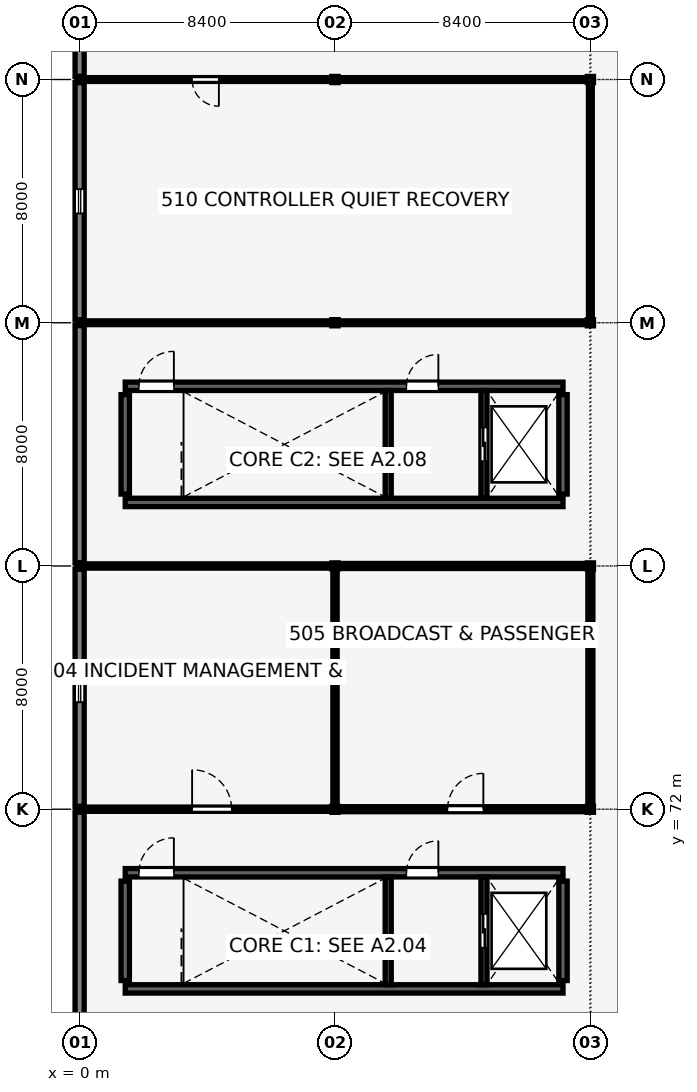
"""IFC4 building model, lengths in metres.
Left out: names, types, materials, properties, quantities, classifications, styles, units other than length and angle.
Written with IfcOpenShell. Run it as: python <this file> out.ifc"""

import sys

from ifc_helpers import new_model, si_unit, direction, frame, frame_2d, origin, origin_2d, place, context, subcontext, project, spatial, rectangle, hollow_rectangle, i_section, extrude, element, fill, save


model = new_model("IFC4")
c1 = context("Model", 3, precision=1e-05, world=origin(), true_north=direction((0.0, 1.0)))
c2 = subcontext(c1, "Body", "Model", "MODEL_VIEW")
j1 = project(units=[si_unit("LENGTHUNIT", "METRE"), si_unit("PLANEANGLEUNIT", "RADIAN")], contexts=[c1])
p1 = place(None, origin())
s1 = spatial("IfcSite", under=j1, at=p1, CompositionType="ELEMENT")
p2 = place(p1, origin())
s2 = spatial("IfcBuilding", under=s1, at=p2, CompositionType="ELEMENT")
p3 = place(p2, frame((0.0, 0.0, 21.04)))
s3 = spatial("IfcBuildingStorey", under=s2, at=p3, CompositionType="ELEMENT", Elevation=21.04)
p4 = place(p3, frame((1.5, 66.09, 0.0), z_axis=(0.0, 0.0, 1.0), x_axis=(1.0, 0.0, 0.0)))
e1 = element("IfcWall", 1, at=p4, inside=s3, PredefinedType="SHEAR", context=c2, shape_type="SweptSolid", body=[
    extrude(rectangle(XDim=14.4, YDim=0.275, at=frame_2d((7.2, 0.0))), origin(), (0.0, 0.0, 1.0), 3.92),
])
p5 = place(p3, frame((1.5, 69.91, 0.0), z_axis=(0.0, 0.0, 1.0), x_axis=(1.0, 0.0, 0.0)))
e2 = element("IfcWall", 2, at=p5, inside=s3, PredefinedType="SHEAR", context=c2, shape_type="SweptSolid", body=[
    extrude(rectangle(XDim=14.4, YDim=0.275, at=frame_2d((7.2, 0.0))), origin(), (0.0, 0.0, 1.0), 3.92),
])
p6 = place(p5, frame((0.45, 0.0, 0.0), z_axis=(0.0, 0.0, 1.0), x_axis=(1.0, 0.0, 0.0)))
e3 = element("IfcOpeningElement", 3, at=p6, cuts=e2, PredefinedType="OPENING", context=c2, shape_type="SweptSolid", body=[
    extrude(rectangle(XDim=1.15, YDim=2.15, at=frame_2d((0.575, 1.075))), frame((0.0, 0.147, 0.0), z_axis=(0.0, -1.0, 0.0), x_axis=(1.0, 0.0, 0.0)), (0.0, 0.0, 1.0), 0.295),
])
p7 = place(p5, frame((9.25, 0.0, 0.0), z_axis=(0.0, 0.0, 1.0), x_axis=(1.0, 0.0, 0.0)))
e4 = element("IfcOpeningElement", 4, at=p7, cuts=e2, PredefinedType="OPENING", context=c2, shape_type="SweptSolid", body=[
    extrude(rectangle(XDim=1.05, YDim=2.15, at=frame_2d((0.525, 1.075))), frame((0.0, 0.147, 0.0), z_axis=(0.0, -1.0, 0.0), x_axis=(1.0, 0.0, 0.0)), (0.0, 0.0, 1.0), 0.295),
])
for number, where, z_axis, x_axis in (
    (5, (1.5, 66.365, 0.0), (0.0, 0.0, 1.0), (0.0, 1.0, 0.0)),
    (6, (15.9, 66.365, 0.0), (0.0, 0.0, 1.0), (0.0, 1.0, 0.0)),
):
    element("IfcWall", number, at=place(p3, frame(where, z_axis=z_axis, x_axis=x_axis)), inside=s3, PredefinedType="SHEAR", context=c2, shape_type="SweptSolid", body=[
        extrude(rectangle(XDim=3.27, YDim=0.275, at=frame_2d((1.635, 0.0))), origin(), (0.0, 0.0, 1.0), 3.92),
    ])
p8 = place(p3, frame((1.5, 82.09, 0.0), z_axis=(0.0, 0.0, 1.0), x_axis=(1.0, 0.0, 0.0)))
e7 = element("IfcWall", 7, at=p8, inside=s3, PredefinedType="SHEAR", context=c2, shape_type="SweptSolid", body=[
    extrude(rectangle(XDim=14.4, YDim=0.275, at=frame_2d((7.2, 0.0))), origin(), (0.0, 0.0, 1.0), 3.92),
])
p9 = place(p3, frame((1.5, 85.91, 0.0), z_axis=(0.0, 0.0, 1.0), x_axis=(1.0, 0.0, 0.0)))
e8 = element("IfcWall", 8, at=p9, inside=s3, PredefinedType="SHEAR", context=c2, shape_type="SweptSolid", body=[
    extrude(rectangle(XDim=14.4, YDim=0.275, at=frame_2d((7.2, 0.0))), origin(), (0.0, 0.0, 1.0), 3.92),
])
p10 = place(p9, frame((0.45, 0.0, 0.0), z_axis=(0.0, 0.0, 1.0), x_axis=(1.0, 0.0, 0.0)))
e9 = element("IfcOpeningElement", 9, at=p10, cuts=e8, PredefinedType="OPENING", context=c2, shape_type="SweptSolid", body=[
    extrude(rectangle(XDim=1.15, YDim=2.15, at=frame_2d((0.575, 1.075))), frame((0.0, 0.147, 0.0), z_axis=(0.0, -1.0, 0.0), x_axis=(1.0, 0.0, 0.0)), (0.0, 0.0, 1.0), 0.295),
])
p11 = place(p9, frame((9.25, 0.0, 0.0), z_axis=(0.0, 0.0, 1.0), x_axis=(1.0, 0.0, 0.0)))
e10 = element("IfcOpeningElement", 10, at=p11, cuts=e8, PredefinedType="OPENING", context=c2, shape_type="SweptSolid", body=[
    extrude(rectangle(XDim=1.05, YDim=2.15, at=frame_2d((0.525, 1.075))), frame((0.0, 0.147, 0.0), z_axis=(0.0, -1.0, 0.0), x_axis=(1.0, 0.0, 0.0)), (0.0, 0.0, 1.0), 0.295),
])
for number, where, z_axis, x_axis in (
    (11, (1.5, 82.365, 0.0), (0.0, 0.0, 1.0), (0.0, 1.0, 0.0)),
    (12, (15.9, 82.365, 0.0), (0.0, 0.0, 1.0), (0.0, 1.0, 0.0)),
):
    element("IfcWall", number, at=place(p3, frame(where, z_axis=z_axis, x_axis=x_axis)), inside=s3, PredefinedType="SHEAR", context=c2, shape_type="SweptSolid", body=[
        extrude(rectangle(XDim=3.27, YDim=0.275, at=frame_2d((1.635, 0.0))), origin(), (0.0, 0.0, 1.0), 3.92),
    ])
p12 = place(p3, frame((0.0, 72.0, 0.0), z_axis=(0.0, 0.0, 1.0), x_axis=(1.0, 0.0, 0.0)))
e13 = element("IfcColumn", 13, at=p12, inside=s3, PredefinedType="COLUMN", context=c2, shape_type="SweptSolid", body=[
    extrude(hollow_rectangle(XDim=0.18, YDim=0.18, WallThickness=0.008, InnerFilletRadius=0.012, OuterFilletRadius=0.02, at=origin_2d()), origin(), (0.0, 0.0, 1.0), 3.92),
])
p13 = place(p3, frame((0.0, 80.0, 0.0), z_axis=(0.0, 0.0, 1.0), x_axis=(1.0, 0.0, 0.0)))
e14 = element("IfcColumn", 14, at=p13, inside=s3, PredefinedType="COLUMN", context=c2, shape_type="SweptSolid", body=[
    extrude(hollow_rectangle(XDim=0.2, YDim=0.2, WallThickness=0.01, InnerFilletRadius=0.015, OuterFilletRadius=0.025, at=origin_2d()), origin(), (0.0, 0.0, 1.0), 3.92),
])
p14 = place(p3, frame((0.0, 88.0, 0.0), z_axis=(0.0, 0.0, 1.0), x_axis=(1.0, 0.0, 0.0)))
e15 = element("IfcColumn", 15, at=p14, inside=s3, PredefinedType="COLUMN", context=c2, shape_type="SweptSolid", body=[
    extrude(hollow_rectangle(XDim=0.18, YDim=0.18, WallThickness=0.008, InnerFilletRadius=0.012, OuterFilletRadius=0.02, at=origin_2d()), origin(), (0.0, 0.0, 1.0), 3.92),
])
p15 = place(p3, frame((0.0, 96.0, 0.0), z_axis=(0.0, 0.0, 1.0), x_axis=(1.0, 0.0, 0.0)))
e16 = element("IfcColumn", 16, at=p15, inside=s3, PredefinedType="COLUMN", context=c2, shape_type="SweptSolid", body=[
    extrude(hollow_rectangle(XDim=0.2, YDim=0.2, WallThickness=0.01, InnerFilletRadius=0.015, OuterFilletRadius=0.025, at=origin_2d()), origin(), (0.0, 0.0, 1.0), 3.92),
])
for number, where, z_axis, x_axis in (
    (17, (8.4, 72.0, 0.0), (0.0, 0.0, 1.0), (1.0, 0.0, 0.0)),
    (18, (8.4, 80.0, 0.0), (0.0, 0.0, 1.0), (1.0, 0.0, 0.0)),
    (19, (8.4, 88.0, 0.0), (0.0, 0.0, 1.0), (1.0, 0.0, 0.0)),
    (20, (8.4, 96.0, 0.0), (0.0, 0.0, 1.0), (1.0, 0.0, 0.0)),
):
    element("IfcColumn", number, at=place(p3, frame(where, z_axis=z_axis, x_axis=x_axis)), inside=s3, PredefinedType="COLUMN", context=c2, shape_type="SweptSolid", body=[
        extrude(i_section(OverallWidth=0.204, OverallDepth=0.203, WebThickness=0.007, FlangeThickness=0.011, FilletRadius=0.01, at=origin_2d()), origin(), (0.0, 0.0, 1.0), 4.82),
    ])
for number, where, z_axis, x_axis in (
    (21, (16.8, 72.0, 0.0), (0.0, 0.0, 1.0), (1.0, 0.0, 0.0)),
    (22, (16.8, 80.0, 0.0), (0.0, 0.0, 1.0), (1.0, 0.0, 0.0)),
    (23, (16.8, 88.0, 0.0), (0.0, 0.0, 1.0), (1.0, 0.0, 0.0)),
    (24, (16.8, 96.0, 0.0), (0.0, 0.0, 1.0), (1.0, 0.0, 0.0)),
):
    element("IfcColumn", number, at=place(p3, frame(where, z_axis=z_axis, x_axis=x_axis)), inside=s3, PredefinedType="COLUMN", context=c2, shape_type="SweptSolid", body=[
        extrude(i_section(OverallWidth=0.204, OverallDepth=0.203, WebThickness=0.007, FlangeThickness=0.011, FilletRadius=0.01, at=origin_2d()), origin(), (0.0, 0.0, 1.0), 5.72),
    ])
p16 = place(p3, frame((0.0, 64.1, 0.0), z_axis=(0.0, 0.0, 1.0), x_axis=(0.0, 1.0, 0.0)))
e25 = element("IfcWall", 25, at=p16, inside=s3, PredefinedType="SOLIDWALL", context=c2, shape_type="SweptSolid", body=[
    extrude(rectangle(XDim=7.81, YDim=0.3, at=frame_2d((3.905, 0.0))), origin(), (0.0, 0.0, 1.0), 3.62),
])
p17 = place(p3, frame((0.0, 72.09, 0.0), z_axis=(0.0, 0.0, 1.0), x_axis=(0.0, 1.0, 0.0)))
e26 = element("IfcWall", 26, at=p17, inside=s3, PredefinedType="SOLIDWALL", context=c2, shape_type="SweptSolid", body=[
    extrude(rectangle(XDim=7.81, YDim=0.3, at=frame_2d((3.905, 0.0))), origin(), (0.0, 0.0, 1.0), 3.62),
])
p18 = place(p17, frame((3.43, 0.0, 0.65), z_axis=(0.0, 0.0, 1.0), x_axis=(1.0, 0.0, 0.0)))
e27 = element("IfcOpeningElement", 27, at=p18, cuts=e26, PredefinedType="OPENING", context=c2, shape_type="SweptSolid", body=[
    extrude(rectangle(XDim=0.95, YDim=2.1, at=frame_2d((0.475, 1.05))), frame((0.0, 0.16, 0.0), z_axis=(0.0, -1.0, 0.0), x_axis=(1.0, 0.0, 0.0)), (0.0, 0.0, 1.0), 0.32),
])
p19 = place(p3, frame((0.0, 80.1, 0.0), z_axis=(0.0, 0.0, 1.0), x_axis=(0.0, 1.0, 0.0)))
e28 = element("IfcWall", 28, at=p19, inside=s3, PredefinedType="SOLIDWALL", context=c2, shape_type="SweptSolid", body=[
    extrude(rectangle(XDim=7.81, YDim=0.3, at=frame_2d((3.905, 0.0))), origin(), (0.0, 0.0, 1.0), 3.62),
])
p20 = place(p3, frame((0.0, 88.09, 0.0), z_axis=(0.0, 0.0, 1.0), x_axis=(0.0, 1.0, 0.0)))
e29 = element("IfcWall", 29, at=p20, inside=s3, PredefinedType="SOLIDWALL", context=c2, shape_type="SweptSolid", body=[
    extrude(rectangle(XDim=7.81, YDim=0.3, at=frame_2d((3.905, 0.0))), origin(), (0.0, 0.0, 1.0), 3.62),
])
p21 = place(p20, frame((3.505, 0.0, 0.65), z_axis=(0.0, 0.0, 1.0), x_axis=(1.0, 0.0, 0.0)))
e30 = element("IfcOpeningElement", 30, at=p21, cuts=e29, PredefinedType="OPENING", context=c2, shape_type="SweptSolid", body=[
    extrude(rectangle(XDim=0.8, YDim=1.85, at=frame_2d((0.4, 0.925))), frame((0.0, 0.16, 0.0), z_axis=(0.0, -1.0, 0.0), x_axis=(1.0, 0.0, 0.0)), (0.0, 0.0, 1.0), 0.32),
])
p22 = place(p3, frame((0.0, 96.1, 0.0), z_axis=(0.0, 0.0, 1.0), x_axis=(0.0, 1.0, 0.0)))
e31 = element("IfcWall", 31, at=p22, inside=s3, PredefinedType="SOLIDWALL", context=c2, shape_type="SweptSolid", body=[
    extrude(rectangle(XDim=7.8, YDim=0.3, at=frame_2d((3.9, 0.0))), origin(), (0.0, 0.0, 1.0), 3.62),
])
p23 = place(p22, frame((3.3, 0.0, 1.55), z_axis=(0.0, 0.0, 1.0), x_axis=(1.0, 0.0, 0.0)))
e32 = element("IfcOpeningElement", 32, at=p23, cuts=e31, PredefinedType="OPENING", context=c2, shape_type="SweptSolid", body=[
    extrude(rectangle(XDim=1.2, YDim=0.95, at=frame_2d((0.6, 0.475))), frame((0.0, 0.16, 0.0), z_axis=(0.0, -1.0, 0.0), x_axis=(1.0, 0.0, 0.0)), (0.0, 0.0, 1.0), 0.32),
])
p24 = place(p3, frame((10.15, 66.228, 0.0), z_axis=(0.0, 0.0, 1.0), x_axis=(0.0, 1.0, 0.0)))
e33 = element("IfcWall", 33, at=p24, inside=s3, PredefinedType="SHEAR", context=c2, shape_type="SweptSolid", body=[
    extrude(rectangle(XDim=3.545, YDim=0.2, at=frame_2d((1.772, 0.0))), origin(), (0.0, 0.0, 1.0), 3.92),
])
p25 = place(p3, frame((13.3, 66.228, 0.0), z_axis=(0.0, 0.0, 1.0), x_axis=(0.0, 1.0, 0.0)))
e34 = element("IfcWall", 34, at=p25, inside=s3, PredefinedType="SHEAR", context=c2, shape_type="SweptSolid", body=[
    extrude(rectangle(XDim=3.545, YDim=0.2, at=frame_2d((1.772, 0.0))), origin(), (0.0, 0.0, 1.0), 3.92),
])
p26 = place(p25, frame((1.222, 0.0, 0.0), z_axis=(0.0, 0.0, 1.0), x_axis=(1.0, 0.0, 0.0)))
e35 = element("IfcOpeningElement", 35, at=p26, cuts=e34, PredefinedType="OPENING", context=c2, shape_type="SweptSolid", body=[
    extrude(rectangle(XDim=1.1, YDim=2.15, at=frame_2d((0.55, 1.075))), frame((0.0, 0.11, 0.0), z_axis=(0.0, -1.0, 0.0), x_axis=(1.0, 0.0, 0.0)), (0.0, 0.0, 1.0), 0.22),
])
p27 = place(p3, frame((10.15, 82.228, 0.0), z_axis=(0.0, 0.0, 1.0), x_axis=(0.0, 1.0, 0.0)))
e36 = element("IfcWall", 36, at=p27, inside=s3, PredefinedType="SHEAR", context=c2, shape_type="SweptSolid", body=[
    extrude(rectangle(XDim=3.545, YDim=0.2, at=frame_2d((1.772, 0.0))), origin(), (0.0, 0.0, 1.0), 3.92),
])
p28 = place(p3, frame((13.3, 82.228, 0.0), z_axis=(0.0, 0.0, 1.0), x_axis=(0.0, 1.0, 0.0)))
e37 = element("IfcWall", 37, at=p28, inside=s3, PredefinedType="SHEAR", context=c2, shape_type="SweptSolid", body=[
    extrude(rectangle(XDim=3.545, YDim=0.2, at=frame_2d((1.772, 0.0))), origin(), (0.0, 0.0, 1.0), 3.92),
])
p29 = place(p28, frame((1.222, 0.0, 0.0), z_axis=(0.0, 0.0, 1.0), x_axis=(1.0, 0.0, 0.0)))
e38 = element("IfcOpeningElement", 38, at=p29, cuts=e37, PredefinedType="OPENING", context=c2, shape_type="SweptSolid", body=[
    extrude(rectangle(XDim=1.1, YDim=2.15, at=frame_2d((0.55, 1.075))), frame((0.0, 0.11, 0.0), z_axis=(0.0, -1.0, 0.0), x_axis=(1.0, 0.0, 0.0)), (0.0, 0.0, 1.0), 0.22),
])
p30 = place(p3, frame((0.08, 72.0, 0.0), z_axis=(0.0, 0.0, 1.0), x_axis=(1.0, 0.0, 0.0)))
e39 = element("IfcWall", 39, at=p30, inside=s3, PredefinedType="PARTITIONING", context=c2, shape_type="SweptSolid", body=[
    extrude(rectangle(XDim=8.228, YDim=0.14, at=frame_2d((4.114, 0.0))), origin(), (0.0, 0.0, 1.0), 3.92),
])
p31 = place(p30, frame((3.62, 0.0, 0.0), z_axis=(0.0, 0.0, 1.0), x_axis=(1.0, 0.0, 0.0)))
e40 = element("IfcOpeningElement", 40, at=p31, cuts=e39, PredefinedType="OPENING", context=c2, shape_type="SweptSolid", body=[
    extrude(rectangle(XDim=1.3, YDim=2.25, at=frame_2d((0.65, 1.125))), frame((0.0, 0.08, 0.0), z_axis=(0.0, -1.0, 0.0), x_axis=(1.0, 0.0, 0.0)), (0.0, 0.0, 1.0), 0.16),
])
p32 = place(p3, frame((8.492, 72.0, 0.0), z_axis=(0.0, 0.0, 1.0), x_axis=(1.0, 0.0, 0.0)))
e41 = element("IfcWall", 41, at=p32, inside=s3, PredefinedType="PARTITIONING", context=c2, shape_type="SweptSolid", body=[
    extrude(rectangle(XDim=8.217, YDim=0.165, at=frame_2d((4.108, 0.0))), origin(), (0.0, 0.0, 1.0), 3.92),
])
p33 = place(p32, frame((3.608, 0.0, 0.0), z_axis=(0.0, 0.0, 1.0), x_axis=(1.0, 0.0, 0.0)))
e42 = element("IfcOpeningElement", 42, at=p33, cuts=e41, PredefinedType="OPENING", context=c2, shape_type="SweptSolid", body=[
    extrude(rectangle(XDim=1.18, YDim=2.22, at=frame_2d((0.59, 1.11))), frame((0.0, 0.093, 0.0), z_axis=(0.0, -1.0, 0.0), x_axis=(1.0, 0.0, 0.0)), (0.0, 0.0, 1.0), 0.185),
])
p34 = place(p3, frame((0.09, 96.0, 0.0), z_axis=(0.0, 0.0, 1.0), x_axis=(1.0, 0.0, 0.0)))
e43 = element("IfcWall", 43, at=p34, inside=s3, PredefinedType="PARTITIONING", context=c2, shape_type="SweptSolid", body=[
    extrude(rectangle(XDim=8.218, YDim=0.125, at=frame_2d((4.109, 0.0))), origin(), (0.0, 0.0, 1.0), 3.92),
])
p35 = place(p34, frame((4.49, 0.0, 0.0), z_axis=(0.0, 0.0, 1.0), x_axis=(-1.0, 0.0, 0.0)))
e44 = element("IfcOpeningElement", 44, at=p35, cuts=e43, PredefinedType="OPENING", context=c2, shape_type="SweptSolid", body=[
    extrude(rectangle(XDim=0.88, YDim=2.1, at=frame_2d((0.44, 1.05))), frame((0.0, 0.073, 0.0), z_axis=(0.0, -1.0, 0.0), x_axis=(1.0, 0.0, 0.0)), (0.0, 0.0, 1.0), 0.145),
])
p36 = place(p3, frame((0.09, 80.0, 0.0), z_axis=(0.0, 0.0, 1.0), x_axis=(1.0, 0.0, 0.0)))
e45 = element("IfcWall", 45, at=p36, inside=s3, PredefinedType="PARTITIONING", context=c2, shape_type="SweptSolid", body=[
    extrude(rectangle(XDim=8.218, YDim=0.14, at=frame_2d((4.109, 0.0))), origin(), (0.0, 0.0, 1.0), 3.92),
])
p37 = place(p3, frame((8.4, 72.092, 0.0), z_axis=(0.0, 0.0, 1.0), x_axis=(0.0, 1.0, 0.0)))
e46 = element("IfcWall", 46, at=p37, inside=s3, PredefinedType="PARTITIONING", context=c2, shape_type="SweptSolid", body=[
    extrude(rectangle(XDim=7.817, YDim=0.14, at=frame_2d((3.908, 0.0))), origin(), (0.0, 0.0, 1.0), 3.92),
])
p38 = place(p3, frame((8.492, 80.0, 0.0), z_axis=(0.0, 0.0, 1.0), x_axis=(1.0, 0.0, 0.0)))
e47 = element("IfcWall", 47, at=p38, inside=s3, PredefinedType="PARTITIONING", context=c2, shape_type="SweptSolid", body=[
    extrude(rectangle(XDim=8.217, YDim=0.165, at=frame_2d((4.108, 0.0))), origin(), (0.0, 0.0, 1.0), 3.92),
])
p39 = place(p3, frame((16.8, 72.092, 0.0), z_axis=(0.0, 0.0, 1.0), x_axis=(0.0, 1.0, 0.0)))
e48 = element("IfcWall", 48, at=p39, inside=s3, PredefinedType="PARTITIONING", context=c2, shape_type="SweptSolid", body=[
    extrude(rectangle(XDim=7.817, YDim=0.165, at=frame_2d((3.908, 0.0))), origin(), (0.0, 0.0, 1.0), 3.92),
])
p40 = place(p3, frame((8.492, 96.0, 0.0), z_axis=(0.0, 0.0, 1.0), x_axis=(1.0, 0.0, 0.0)))
e49 = element("IfcWall", 49, at=p40, inside=s3, PredefinedType="PARTITIONING", context=c2, shape_type="SweptSolid", body=[
    extrude(rectangle(XDim=8.217, YDim=0.125, at=frame_2d((4.108, 0.0))), origin(), (0.0, 0.0, 1.0), 3.92),
])
p41 = place(p3, frame((0.08, 88.0, 0.0), z_axis=(0.0, 0.0, 1.0), x_axis=(1.0, 0.0, 0.0)))
e50 = element("IfcWall", 50, at=p41, inside=s3, PredefinedType="PARTITIONING", context=c2, shape_type="SweptSolid", body=[
    extrude(rectangle(XDim=8.228, YDim=0.125, at=frame_2d((4.114, 0.0))), origin(), (0.0, 0.0, 1.0), 3.92),
])
p42 = place(p3, frame((8.492, 88.0, 0.0), z_axis=(0.0, 0.0, 1.0), x_axis=(1.0, 0.0, 0.0)))
e51 = element("IfcWall", 51, at=p42, inside=s3, PredefinedType="PARTITIONING", context=c2, shape_type="SweptSolid", body=[
    extrude(rectangle(XDim=8.217, YDim=0.125, at=frame_2d((4.108, 0.0))), origin(), (0.0, 0.0, 1.0), 3.92),
])
p43 = place(p3, frame((16.8, 88.092, 0.0), z_axis=(0.0, 0.0, 1.0), x_axis=(0.0, 1.0, 0.0)))
e52 = element("IfcWall", 52, at=p43, inside=s3, PredefinedType="PARTITIONING", context=c2, shape_type="SweptSolid", body=[
    extrude(rectangle(XDim=7.817, YDim=0.125, at=frame_2d((3.908, 0.0))), origin(), (0.0, 0.0, 1.0), 3.92),
])
p44 = place(p18, origin())
e53 = element("IfcWindow", 53, at=p44, inside=s3, PartitioningType="SINGLE_PANEL", PredefinedType="WINDOW", context=c2, shape_type="SweptSolid", body=[
    extrude(rectangle(XDim=0.95, YDim=2.1, at=frame_2d((0.475, 1.05))), frame((0.0, 0.03, 0.0), z_axis=(0.0, -1.0, 0.0), x_axis=(1.0, 0.0, 0.0)), (0.0, 0.0, 1.0), 0.06),
])
fill(e27, e53)
p45 = place(p21, origin())
e54 = element("IfcWindow", 54, at=p45, inside=s3, PartitioningType="SINGLE_PANEL", PredefinedType="WINDOW", context=c2, shape_type="SweptSolid", body=[
    extrude(rectangle(XDim=0.8, YDim=1.85, at=frame_2d((0.4, 0.925))), frame((0.0, 0.03, 0.0), z_axis=(0.0, -1.0, 0.0), x_axis=(1.0, 0.0, 0.0)), (0.0, 0.0, 1.0), 0.06),
])
fill(e30, e54)
p46 = place(p6, origin())
e55 = element("IfcDoor", 55, at=p46, inside=s3, OperationType="SINGLE_SWING_RIGHT", PredefinedType="DOOR", context=c2, shape_type="SweptSolid", body=[
    extrude(rectangle(XDim=1.15, YDim=2.15, at=frame_2d((0.575, 1.075))), frame((0.0, 0.025, 0.0), z_axis=(0.0, -1.0, 0.0), x_axis=(1.0, 0.0, 0.0)), (0.0, 0.0, 1.0), 0.05),
])
fill(e3, e55)
p47 = place(p7, origin())
e56 = element("IfcDoor", 56, at=p47, inside=s3, OperationType="SINGLE_SWING_RIGHT", PredefinedType="DOOR", context=c2, shape_type="SweptSolid", body=[
    extrude(rectangle(XDim=1.05, YDim=2.15, at=frame_2d((0.525, 1.075))), frame((0.0, 0.025, 0.0), z_axis=(0.0, -1.0, 0.0), x_axis=(1.0, 0.0, 0.0)), (0.0, 0.0, 1.0), 0.05),
])
fill(e4, e56)
p48 = place(p26, origin())
e57 = element("IfcDoor", 57, at=p48, inside=s3, OperationType="DOUBLE_DOOR_SLIDING", PredefinedType="DOOR", context=c2, shape_type="SweptSolid", body=[
    extrude(rectangle(XDim=1.1, YDim=2.15, at=frame_2d((0.55, 1.075))), frame((0.0, 0.025, 0.0), z_axis=(0.0, -1.0, 0.0), x_axis=(1.0, 0.0, 0.0)), (0.0, 0.0, 1.0), 0.05),
])
fill(e35, e57)
p49 = place(p10, origin())
e58 = element("IfcDoor", 58, at=p49, inside=s3, OperationType="SINGLE_SWING_RIGHT", PredefinedType="DOOR", context=c2, shape_type="SweptSolid", body=[
    extrude(rectangle(XDim=1.15, YDim=2.15, at=frame_2d((0.575, 1.075))), frame((0.0, 0.025, 0.0), z_axis=(0.0, -1.0, 0.0), x_axis=(1.0, 0.0, 0.0)), (0.0, 0.0, 1.0), 0.05),
])
fill(e9, e58)
p50 = place(p11, origin())
e59 = element("IfcDoor", 59, at=p50, inside=s3, OperationType="SINGLE_SWING_RIGHT", PredefinedType="DOOR", context=c2, shape_type="SweptSolid", body=[
    extrude(rectangle(XDim=1.05, YDim=2.15, at=frame_2d((0.525, 1.075))), frame((0.0, 0.025, 0.0), z_axis=(0.0, -1.0, 0.0), x_axis=(1.0, 0.0, 0.0)), (0.0, 0.0, 1.0), 0.05),
])
fill(e10, e59)
p51 = place(p29, origin())
e60 = element("IfcDoor", 60, at=p51, inside=s3, OperationType="DOUBLE_DOOR_SLIDING", PredefinedType="DOOR", context=c2, shape_type="SweptSolid", body=[
    extrude(rectangle(XDim=1.1, YDim=2.15, at=frame_2d((0.55, 1.075))), frame((0.0, 0.025, 0.0), z_axis=(0.0, -1.0, 0.0), x_axis=(1.0, 0.0, 0.0)), (0.0, 0.0, 1.0), 0.05),
])
fill(e38, e60)
p52 = place(p31, origin())
e61 = element("IfcDoor", 61, at=p52, inside=s3, OperationType="SINGLE_SWING_LEFT", PredefinedType="DOOR", context=c2, shape_type="SweptSolid", body=[
    extrude(rectangle(XDim=1.3, YDim=2.25, at=frame_2d((0.65, 1.125))), frame((0.0, 0.025, 0.0), z_axis=(0.0, -1.0, 0.0), x_axis=(1.0, 0.0, 0.0)), (0.0, 0.0, 1.0), 0.05),
])
fill(e40, e61)
p53 = place(p33, origin())
e62 = element("IfcDoor", 62, at=p53, inside=s3, OperationType="SINGLE_SWING_RIGHT", PredefinedType="DOOR", context=c2, shape_type="SweptSolid", body=[
    extrude(rectangle(XDim=1.18, YDim=2.22, at=frame_2d((0.59, 1.11))), frame((0.0, 0.025, 0.0), z_axis=(0.0, -1.0, 0.0), x_axis=(1.0, 0.0, 0.0)), (0.0, 0.0, 1.0), 0.05),
])
fill(e42, e62)
p54 = place(p35, origin())
e63 = element("IfcDoor", 63, at=p54, inside=s3, OperationType="SINGLE_SWING_LEFT", PredefinedType="DOOR", context=c2, shape_type="SweptSolid", body=[
    extrude(rectangle(XDim=0.88, YDim=2.1, at=frame_2d((0.44, 1.05))), frame((0.0, 0.025, 0.0), z_axis=(0.0, -1.0, 0.0), x_axis=(1.0, 0.0, 0.0)), (0.0, 0.0, 1.0), 0.05),
])
fill(e44, e63)
save(model, sys.argv[1])
